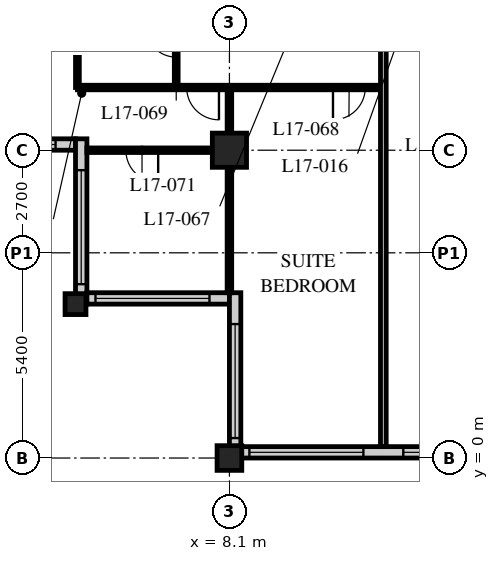
"""IFC4 building model, lengths in metres.
Left out: names, types, materials, properties, quantities, classifications, styles, units other than length and angle.
Written with IfcOpenShell. Run it as: python <this file> out.ifc"""

import sys

from ifc_helpers import new_model, si_unit, direction, frame, frame_2d, origin, origin_2d, place, context, subcontext, project, spatial, rectangle, hollow_rectangle, extrude, element, fill, save


model = new_model("IFC4")
c1 = context("Model", 3, precision=1e-05, world=origin(), true_north=direction((0.0, 1.0)))
c2 = subcontext(c1, "Body", "Model", "MODEL_VIEW")
j1 = project(units=[si_unit("LENGTHUNIT", "METRE"), si_unit("PLANEANGLEUNIT", "RADIAN")], contexts=[c1])
p1 = place(None, origin())
s1 = spatial("IfcSite", under=j1, at=p1, CompositionType="ELEMENT")
p2 = place(p1, origin())
s2 = spatial("IfcBuilding", under=s1, at=p2, CompositionType="ELEMENT")
p3 = place(p2, frame((0.0, 0.0, 70.4)))
s3 = spatial("IfcBuildingStorey", under=s2, at=p3, CompositionType="ELEMENT", Elevation=70.4)
p4 = place(p3, frame((4.05, 4.05, 0.0), z_axis=(0.0, 0.0, 1.0), x_axis=(1.0, 0.0, 0.0)))
e1 = element("IfcColumn", 1, at=p4, inside=s3, PredefinedType="COLUMN", context=c2, shape_type="SweptSolid", body=[
    extrude(hollow_rectangle(XDim=0.55, YDim=0.55, WallThickness=0.05, at=origin_2d()), origin(), (0.0, 0.0, 1.0), 3.4),
])
p5 = place(p3, frame((8.1, 0.0, 0.0), z_axis=(0.0, 0.0, 1.0), x_axis=(1.0, 0.0, 0.0)))
e2 = element("IfcColumn", 2, at=p5, inside=s3, PredefinedType="COLUMN", context=c2, shape_type="SweptSolid", body=[
    extrude(hollow_rectangle(XDim=0.65, YDim=0.65, WallThickness=0.05, at=origin_2d()), origin(), (0.0, 0.0, 1.0), 3.4),
])
p6 = place(p3, frame((8.1, 8.1, 0.0), z_axis=(0.0, 0.0, 1.0), x_axis=(1.0, 0.0, 0.0)))
e3 = element("IfcColumn", 3, at=p6, inside=s3, PredefinedType="COLUMN", context=c2, shape_type="SweptSolid", body=[
    extrude(hollow_rectangle(XDim=0.9, YDim=0.9, WallThickness=0.09, at=origin_2d()), origin(), (0.0, 0.0, 1.0), 3.4),
])
p7 = place(p3, frame((8.4, 0.15, 0.0), z_axis=(0.0, 0.0, 1.0), x_axis=(1.0, 0.0, 0.0)))
e4 = element("IfcWall", 4, at=p7, inside=s3, PredefinedType="SOLIDWALL", context=c2, shape_type="SweptSolid", body=[
    extrude(rectangle(XDim=40.2, YDim=0.3, at=frame_2d((20.1, 0.0))), origin(), (0.0, 0.0, 1.0), 3.19),
])
p8 = place(p7, frame((0.225, 0.0, 0.9)))
e5 = element("IfcOpeningElement", 5, at=p8, cuts=e4, PredefinedType="OPENING", context=c2, shape_type="SweptSolid", body=[
    extrude(rectangle(XDim=3.0, YDim=2.0, at=frame_2d((1.5, 1.0))), frame((0.0, 0.16, 0.0), z_axis=(0.0, -1.0, 0.0), x_axis=(1.0, 0.0, 0.0)), (0.0, 0.0, 1.0), 0.32),
])
p9 = place(p7, frame((4.275, 0.0, 0.9)))
e6 = element("IfcOpeningElement", 6, at=p9, cuts=e4, PredefinedType="OPENING", context=c2, shape_type="SweptSolid", body=[
    extrude(rectangle(XDim=3.0, YDim=2.0, at=frame_2d((1.5, 1.0))), frame((0.0, 0.16, 0.0), z_axis=(0.0, -1.0, 0.0), x_axis=(1.0, 0.0, 0.0)), (0.0, 0.0, 1.0), 0.32),
])
p10 = place(p7, frame((8.325, 0.0, 0.9)))
e7 = element("IfcOpeningElement", 7, at=p10, cuts=e4, PredefinedType="OPENING", context=c2, shape_type="SweptSolid", body=[
    extrude(rectangle(XDim=3.0, YDim=2.0, at=frame_2d((1.5, 1.0))), frame((0.0, 0.16, 0.0), z_axis=(0.0, -1.0, 0.0), x_axis=(1.0, 0.0, 0.0)), (0.0, 0.0, 1.0), 0.32),
])
p11 = place(p7, frame((12.375, 0.0, 0.9)))
e8 = element("IfcOpeningElement", 8, at=p11, cuts=e4, PredefinedType="OPENING", context=c2, shape_type="SweptSolid", body=[
    extrude(rectangle(XDim=3.0, YDim=2.0, at=frame_2d((1.5, 1.0))), frame((0.0, 0.16, 0.0), z_axis=(0.0, -1.0, 0.0), x_axis=(1.0, 0.0, 0.0)), (0.0, 0.0, 1.0), 0.32),
])
p12 = place(p7, frame((16.425, 0.0, 0.9)))
e9 = element("IfcOpeningElement", 9, at=p12, cuts=e4, PredefinedType="OPENING", context=c2, shape_type="SweptSolid", body=[
    extrude(rectangle(XDim=3.0, YDim=2.0, at=frame_2d((1.5, 1.0))), frame((0.0, 0.16, 0.0), z_axis=(0.0, -1.0, 0.0), x_axis=(1.0, 0.0, 0.0)), (0.0, 0.0, 1.0), 0.32),
])
p13 = place(p7, frame((20.475, 0.0, 0.9)))
e10 = element("IfcOpeningElement", 10, at=p13, cuts=e4, PredefinedType="OPENING", context=c2, shape_type="SweptSolid", body=[
    extrude(rectangle(XDim=3.0, YDim=2.0, at=frame_2d((1.5, 1.0))), frame((0.0, 0.16, 0.0), z_axis=(0.0, -1.0, 0.0), x_axis=(1.0, 0.0, 0.0)), (0.0, 0.0, 1.0), 0.32),
])
p14 = place(p7, frame((24.525, 0.0, 0.9)))
e11 = element("IfcOpeningElement", 11, at=p14, cuts=e4, PredefinedType="OPENING", context=c2, shape_type="SweptSolid", body=[
    extrude(rectangle(XDim=3.0, YDim=2.0, at=frame_2d((1.5, 1.0))), frame((0.0, 0.16, 0.0), z_axis=(0.0, -1.0, 0.0), x_axis=(1.0, 0.0, 0.0)), (0.0, 0.0, 1.0), 0.32),
])
p15 = place(p7, frame((28.575, 0.0, 0.9)))
e12 = element("IfcOpeningElement", 12, at=p15, cuts=e4, PredefinedType="OPENING", context=c2, shape_type="SweptSolid", body=[
    extrude(rectangle(XDim=3.0, YDim=2.0, at=frame_2d((1.5, 1.0))), frame((0.0, 0.16, 0.0), z_axis=(0.0, -1.0, 0.0), x_axis=(1.0, 0.0, 0.0)), (0.0, 0.0, 1.0), 0.32),
])
p16 = place(p7, frame((32.625, 0.0, 0.9)))
e13 = element("IfcOpeningElement", 13, at=p16, cuts=e4, PredefinedType="OPENING", context=c2, shape_type="SweptSolid", body=[
    extrude(rectangle(XDim=3.0, YDim=2.0, at=frame_2d((1.5, 1.0))), frame((0.0, 0.16, 0.0), z_axis=(0.0, -1.0, 0.0), x_axis=(1.0, 0.0, 0.0)), (0.0, 0.0, 1.0), 0.32),
])
p17 = place(p7, frame((36.675, 0.0, 0.9)))
e14 = element("IfcOpeningElement", 14, at=p17, cuts=e4, PredefinedType="OPENING", context=c2, shape_type="SweptSolid", body=[
    extrude(rectangle(XDim=3.0, YDim=2.0, at=frame_2d((1.5, 1.0))), frame((0.0, 0.16, 0.0), z_axis=(0.0, -1.0, 0.0), x_axis=(1.0, 0.0, 0.0)), (0.0, 0.0, 1.0), 0.32),
])
p18 = place(p3, frame((0.3, 8.25, 0.0), z_axis=(0.0, 0.0, 1.0), x_axis=(1.0, 0.0, 0.0)))
e15 = element("IfcWall", 15, at=p18, inside=s3, PredefinedType="SOLIDWALL", context=c2, shape_type="SweptSolid", body=[
    extrude(rectangle(XDim=3.75, YDim=0.3, at=frame_2d((1.875, 0.0))), origin(), (0.0, 0.0, 1.0), 3.19),
])
p19 = place(p18, frame((0.225, 0.0, 0.9)))
e16 = element("IfcOpeningElement", 16, at=p19, cuts=e15, PredefinedType="OPENING", context=c2, shape_type="SweptSolid", body=[
    extrude(rectangle(XDim=3.0, YDim=1.5, at=frame_2d((1.5, 0.75))), frame((0.0, 0.16, 0.0), z_axis=(0.0, -1.0, 0.0), x_axis=(1.0, 0.0, 0.0)), (0.0, 0.0, 1.0), 0.32),
])
p20 = place(p3, frame((4.2, 8.4, 0.0), z_axis=(0.0, 0.0, 1.0), x_axis=(0.0, -1.0, 0.0)))
e17 = element("IfcWall", 17, at=p20, inside=s3, PredefinedType="SOLIDWALL", context=c2, shape_type="SweptSolid", body=[
    extrude(rectangle(XDim=4.35, YDim=0.3, at=frame_2d((2.175, 0.0))), origin(), (0.0, 0.0, 1.0), 3.19),
])
p21 = place(p20, frame((0.825, 0.0, 0.9)))
e18 = element("IfcOpeningElement", 18, at=p21, cuts=e17, PredefinedType="OPENING", context=c2, shape_type="SweptSolid", body=[
    extrude(rectangle(XDim=3.0, YDim=1.5, at=frame_2d((1.5, 0.75))), frame((0.0, 0.16, 0.0), z_axis=(0.0, -1.0, 0.0), x_axis=(1.0, 0.0, 0.0)), (0.0, 0.0, 1.0), 0.32),
])
p22 = place(p3, frame((4.35, 4.2, 0.0), z_axis=(0.0, 0.0, 1.0), x_axis=(1.0, 0.0, 0.0)))
e19 = element("IfcWall", 19, at=p22, inside=s3, PredefinedType="SOLIDWALL", context=c2, shape_type="SweptSolid", body=[
    extrude(rectangle(XDim=3.75, YDim=0.3, at=frame_2d((1.875, 0.0))), origin(), (0.0, 0.0, 1.0), 3.19),
])
p23 = place(p22, frame((0.225, 0.0, 0.9)))
e20 = element("IfcOpeningElement", 20, at=p23, cuts=e19, PredefinedType="OPENING", context=c2, shape_type="SweptSolid", body=[
    extrude(rectangle(XDim=3.0, YDim=1.5, at=frame_2d((1.5, 0.75))), frame((0.0, 0.16, 0.0), z_axis=(0.0, -1.0, 0.0), x_axis=(1.0, 0.0, 0.0)), (0.0, 0.0, 1.0), 0.32),
])
p24 = place(p3, frame((8.25, 4.35, 0.0), z_axis=(0.0, 0.0, 1.0), x_axis=(0.0, -1.0, 0.0)))
e21 = element("IfcWall", 21, at=p24, inside=s3, PredefinedType="SOLIDWALL", context=c2, shape_type="SweptSolid", body=[
    extrude(rectangle(XDim=4.35, YDim=0.3, at=frame_2d((2.175, 0.0))), origin(), (0.0, 0.0, 1.0), 3.19),
])
p25 = place(p24, frame((0.825, 0.0, 0.9)))
e22 = element("IfcOpeningElement", 22, at=p25, cuts=e21, PredefinedType="OPENING", context=c2, shape_type="SweptSolid", body=[
    extrude(rectangle(XDim=3.0, YDim=1.5, at=frame_2d((1.5, 0.75))), frame((0.0, 0.16, 0.0), z_axis=(0.0, -1.0, 0.0), x_axis=(1.0, 0.0, 0.0)), (0.0, 0.0, 1.0), 0.32),
])
p26 = place(p3, frame((6.7, 12.15, 0.0), z_axis=(0.0, 0.0, 1.0), x_axis=(0.0, -1.0, 0.0)))
e23 = element("IfcWall", 23, at=p26, inside=s3, PredefinedType="PARTITIONING", context=c2, shape_type="SweptSolid", body=[
    extrude(rectangle(XDim=2.4, YDim=0.1, at=frame_2d((1.2, 0.0))), origin(), (0.0, 0.0, 1.0), 3.19),
])
p27 = place(p26, frame((0.8, 0.0, 0.0)))
e24 = element("IfcOpeningElement", 24, at=p27, cuts=e23, PredefinedType="OPENING", context=c2, shape_type="SweptSolid", body=[
    extrude(rectangle(XDim=0.8, YDim=2.1, at=frame_2d((0.4, 1.05))), frame((0.0, 0.06, 0.0), z_axis=(0.0, -1.0, 0.0), x_axis=(1.0, 0.0, 0.0)), (0.0, 0.0, 1.0), 0.12),
])
p28 = place(p3, frame((4.1, 12.15, 0.0), z_axis=(0.0, 0.0, 1.0), x_axis=(0.0, -1.0, 0.0)))
e25 = element("IfcWall", 25, at=p28, inside=s3, PredefinedType="PARTITIONING", context=c2, shape_type="SweptSolid", body=[
    extrude(rectangle(XDim=2.4, YDim=0.1, at=frame_2d((1.2, 0.0))), origin(), (0.0, 0.0, 1.0), 3.19),
])
p29 = place(p3, frame((4.1, 9.75, 0.0), z_axis=(0.0, 0.0, 1.0), x_axis=(1.0, 0.0, 0.0)))
e26 = element("IfcWall", 26, at=p29, inside=s3, PredefinedType="PARTITIONING", context=c2, shape_type="SweptSolid", body=[
    extrude(rectangle(XDim=8.05, YDim=0.12, at=frame_2d((4.025, 0.0))), origin(), (0.0, 0.0, 1.0), 3.19),
])
p30 = place(p29, frame((6.725, 0.0, 0.0)))
e27 = element("IfcOpeningElement", 27, at=p30, cuts=e26, PredefinedType="OPENING", context=c2, shape_type="SweptSolid", body=[
    extrude(rectangle(XDim=0.85, YDim=2.1, at=frame_2d((0.425, 1.05))), frame((0.0, 0.07, 0.0), z_axis=(0.0, -1.0, 0.0), x_axis=(1.0, 0.0, 0.0)), (0.0, 0.0, 1.0), 0.14),
])
p31 = place(p29, frame((2.875, 0.0, 0.0)))
e28 = element("IfcOpeningElement", 28, at=p31, cuts=e26, PredefinedType="OPENING", context=c2, shape_type="SweptSolid", body=[
    extrude(rectangle(XDim=0.85, YDim=2.1, at=frame_2d((0.425, 1.05))), frame((0.0, 0.07, 0.0), z_axis=(0.0, -1.0, 0.0), x_axis=(1.0, 0.0, 0.0)), (0.0, 0.0, 1.0), 0.14),
])
p32 = place(p3, frame((8.1, 9.75, 0.0), z_axis=(0.0, 0.0, 1.0), x_axis=(0.0, -1.0, 0.0)))
e29 = element("IfcWall", 29, at=p32, inside=s3, PredefinedType="PARTITIONING", context=c2, shape_type="SweptSolid", body=[
    extrude(rectangle(XDim=5.4, YDim=0.12, at=frame_2d((2.7, 0.0))), origin(), (0.0, 0.0, 1.0), 2.578),
])
p33 = place(p3, frame((8.1, 8.1, 0.0), z_axis=(0.0, 0.0, 1.0), x_axis=(-1.0, 0.0, 0.0)))
e30 = element("IfcWall", 30, at=p33, inside=s3, PredefinedType="PARTITIONING", context=c2, shape_type="SweptSolid", body=[
    extrude(rectangle(XDim=3.75, YDim=0.12, at=frame_2d((1.875, 0.0))), origin(), (0.0, 0.0, 1.0), 2.578),
])
p34 = place(p33, frame((1.875, 0.0, 0.0)))
e31 = element("IfcOpeningElement", 31, at=p34, cuts=e30, PredefinedType="OPENING", context=c2, shape_type="SweptSolid", body=[
    extrude(rectangle(XDim=0.85, YDim=2.1, at=frame_2d((0.425, 1.05))), frame((0.0, 0.07, 0.0), z_axis=(0.0, -1.0, 0.0), x_axis=(1.0, 0.0, 0.0)), (0.0, 0.0, 1.0), 0.14),
])
p35 = place(p3, frame((12.15, 12.15, 0.0), z_axis=(0.0, 0.0, 1.0), x_axis=(0.0, -1.0, 0.0)))
e32 = element("IfcWall", 32, at=p35, inside=s3, PredefinedType="PARTITIONING", context=c2, shape_type="SweptSolid", body=[
    extrude(rectangle(XDim=11.85, YDim=0.15, at=frame_2d((5.925, 0.0))), origin(), (0.0, 0.0, 1.0), 3.19),
])
p36 = place(p8, origin())
e33 = element("IfcWindow", 33, at=p36, inside=s3, PartitioningType="SINGLE_PANEL", PredefinedType="WINDOW", context=c2, shape_type="SweptSolid", body=[
    extrude(rectangle(XDim=3.0, YDim=2.0, at=frame_2d((1.5, 1.0))), frame((0.0, 0.03, 0.0), z_axis=(0.0, -1.0, 0.0), x_axis=(1.0, 0.0, 0.0)), (0.0, 0.0, 1.0), 0.06),
])
fill(e5, e33)
p37 = place(p9, origin())
e34 = element("IfcWindow", 34, at=p37, inside=s3, PartitioningType="SINGLE_PANEL", PredefinedType="WINDOW", context=c2, shape_type="SweptSolid", body=[
    extrude(rectangle(XDim=3.0, YDim=2.0, at=frame_2d((1.5, 1.0))), frame((0.0, 0.03, 0.0), z_axis=(0.0, -1.0, 0.0), x_axis=(1.0, 0.0, 0.0)), (0.0, 0.0, 1.0), 0.06),
])
fill(e6, e34)
p38 = place(p19, origin())
e35 = element("IfcWindow", 35, at=p38, inside=s3, PartitioningType="SINGLE_PANEL", PredefinedType="WINDOW", context=c2, shape_type="SweptSolid", body=[
    extrude(rectangle(XDim=3.0, YDim=1.5, at=frame_2d((1.5, 0.75))), frame((0.0, 0.03, 0.0), z_axis=(0.0, -1.0, 0.0), x_axis=(1.0, 0.0, 0.0)), (0.0, 0.0, 1.0), 0.06),
])
fill(e16, e35)
p39 = place(p21, origin())
e36 = element("IfcWindow", 36, at=p39, inside=s3, PartitioningType="SINGLE_PANEL", PredefinedType="WINDOW", context=c2, shape_type="SweptSolid", body=[
    extrude(rectangle(XDim=3.0, YDim=1.5, at=frame_2d((1.5, 0.75))), frame((0.0, 0.03, 0.0), z_axis=(0.0, -1.0, 0.0), x_axis=(1.0, 0.0, 0.0)), (0.0, 0.0, 1.0), 0.06),
])
fill(e18, e36)
p40 = place(p23, origin())
e37 = element("IfcWindow", 37, at=p40, inside=s3, PartitioningType="SINGLE_PANEL", PredefinedType="WINDOW", context=c2, shape_type="SweptSolid", body=[
    extrude(rectangle(XDim=3.0, YDim=1.5, at=frame_2d((1.5, 0.75))), frame((0.0, 0.03, 0.0), z_axis=(0.0, -1.0, 0.0), x_axis=(1.0, 0.0, 0.0)), (0.0, 0.0, 1.0), 0.06),
])
fill(e20, e37)
p41 = place(p25, origin())
e38 = element("IfcWindow", 38, at=p41, inside=s3, PartitioningType="SINGLE_PANEL", PredefinedType="WINDOW", context=c2, shape_type="SweptSolid", body=[
    extrude(rectangle(XDim=3.0, YDim=1.5, at=frame_2d((1.5, 0.75))), frame((0.0, 0.03, 0.0), z_axis=(0.0, -1.0, 0.0), x_axis=(1.0, 0.0, 0.0)), (0.0, 0.0, 1.0), 0.06),
])
fill(e22, e38)
p42 = place(p30, origin())
e39 = element("IfcDoor", 39, at=p42, inside=s3, OperationType="SINGLE_SWING_RIGHT", PredefinedType="DOOR", context=c2, shape_type="SweptSolid", body=[
    extrude(rectangle(XDim=0.85, YDim=2.1, at=frame_2d((0.425, 1.05))), frame((0.0, 0.025, 0.0), z_axis=(0.0, -1.0, 0.0), x_axis=(1.0, 0.0, 0.0)), (0.0, 0.0, 1.0), 0.05),
])
fill(e27, e39)
p43 = place(p27, origin())
e40 = element("IfcDoor", 40, at=p43, inside=s3, OperationType="SINGLE_SWING_RIGHT", PredefinedType="DOOR", context=c2, shape_type="SweptSolid", body=[
    extrude(rectangle(XDim=0.8, YDim=2.1, at=frame_2d((0.4, 1.05))), frame((0.0, 0.025, 0.0), z_axis=(0.0, -1.0, 0.0), x_axis=(1.0, 0.0, 0.0)), (0.0, 0.0, 1.0), 0.05),
])
fill(e24, e40)
p44 = place(p31, origin())
e41 = element("IfcDoor", 41, at=p44, inside=s3, OperationType="SINGLE_SWING_LEFT", PredefinedType="DOOR", context=c2, shape_type="SweptSolid", body=[
    extrude(rectangle(XDim=0.85, YDim=2.1, at=frame_2d((0.425, 1.05))), frame((0.0, 0.025, 0.0), z_axis=(0.0, -1.0, 0.0), x_axis=(1.0, 0.0, 0.0)), (0.0, 0.0, 1.0), 0.05),
])
fill(e28, e41)
p45 = place(p34, origin())
e42 = element("IfcDoor", 42, at=p45, inside=s3, OperationType="SINGLE_SWING_LEFT", PredefinedType="DOOR", context=c2, shape_type="SweptSolid", body=[
    extrude(rectangle(XDim=0.85, YDim=2.1, at=frame_2d((0.425, 1.05))), frame((0.0, 0.025, 0.0), z_axis=(0.0, -1.0, 0.0), x_axis=(1.0, 0.0, 0.0)), (0.0, 0.0, 1.0), 0.05),
])
fill(e31, e42)
save(model, sys.argv[1])
